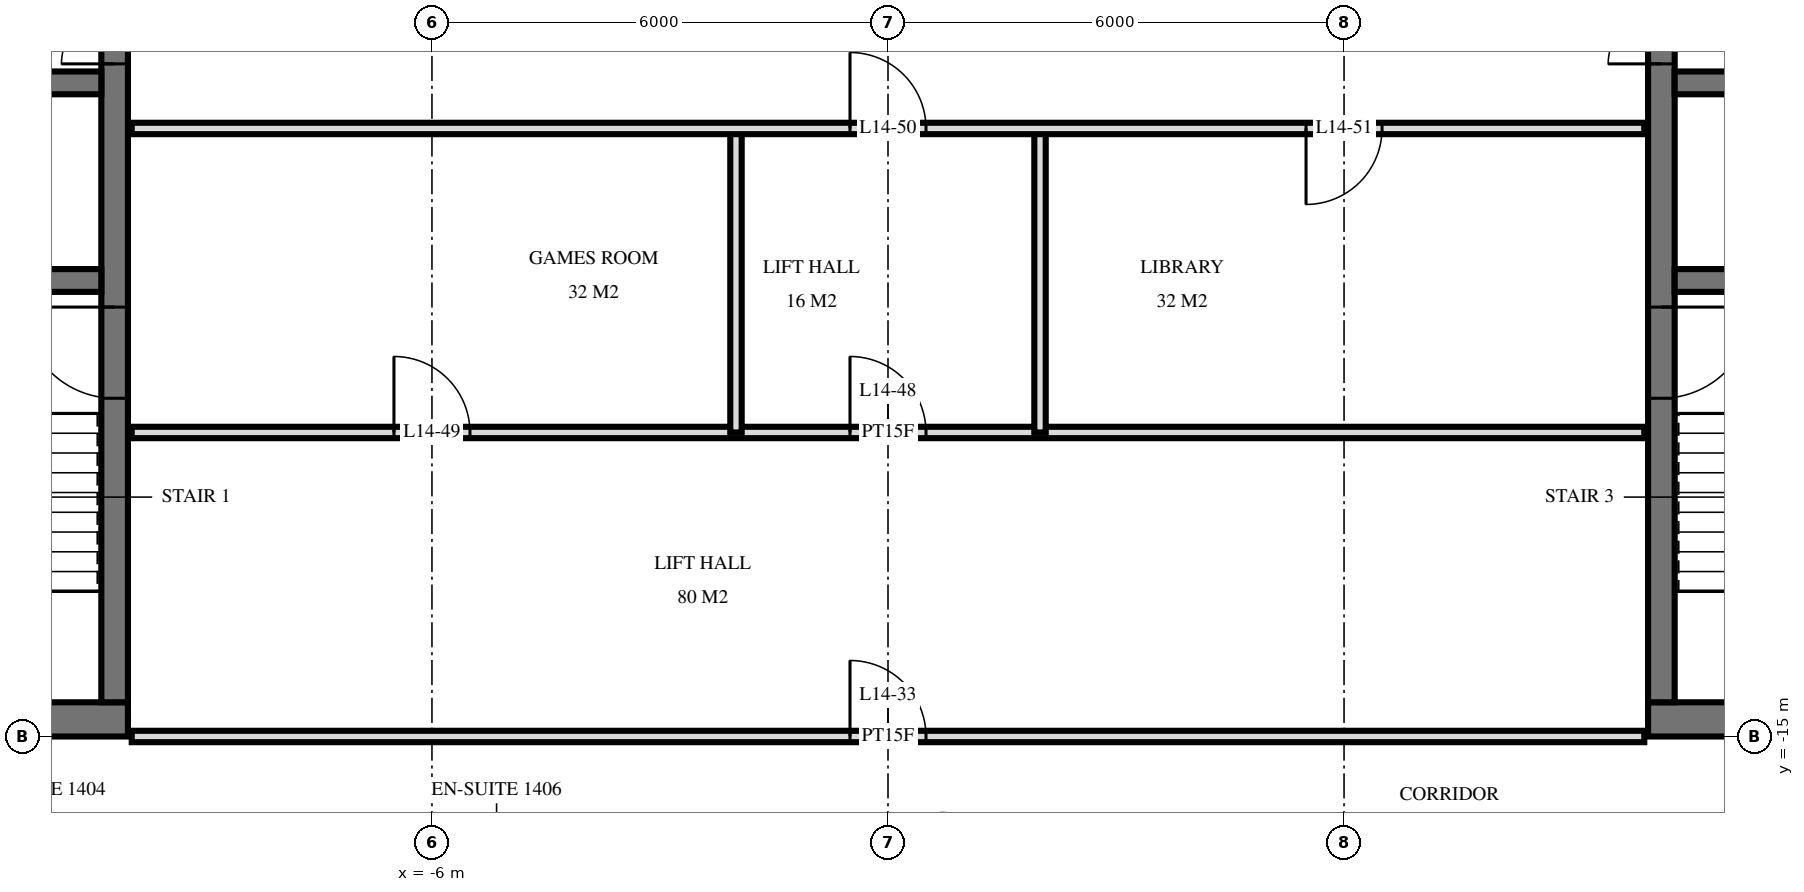
"""IFC4 building model, lengths in metres.
Left out: names, types, materials, properties, quantities, classifications, styles, units other than length and angle.
Written with IfcOpenShell. Run it as: python <this file> out.ifc"""

import sys

from ifc_helpers import new_model, si_unit, direction, frame, frame_2d, origin, place, context, subcontext, project, spatial, rectangle, extrude, element, fill, save


model = new_model("IFC4")
c1 = context("Model", 3, precision=1e-05, world=origin(), true_north=direction((0.0, 1.0)))
c2 = subcontext(c1, "Body", "Model", "MODEL_VIEW")
j1 = project(units=[si_unit("LENGTHUNIT", "METRE"), si_unit("PLANEANGLEUNIT", "RADIAN")], contexts=[c1])
p1 = place(None, origin())
s1 = spatial("IfcSite", under=j1, at=p1, CompositionType="ELEMENT")
p2 = place(p1, origin())
s2 = spatial("IfcBuilding", under=s1, at=p2, CompositionType="ELEMENT")
p3 = place(p2, frame((0.0, 0.0, 60.0)))
s3 = spatial("IfcBuildingStorey", under=s2, at=p3, CompositionType="ELEMENT", Elevation=60.0)
p4 = place(p3, frame((-29.5, -14.775, 0.0), z_axis=(0.0, 0.0, 1.0), x_axis=(1.0, 0.0, 0.0)))
e1 = element("IfcWall", 1, at=p4, inside=s3, PredefinedType="SHEAR", context=c2, shape_type="SweptSolid", body=[
    extrude(rectangle(XDim=19.5, YDim=0.45, at=frame_2d((9.75, 0.0))), origin(), (0.0, 0.0, 1.0), 3.6),
])
p5 = place(p4, frame((11.2, 0.0, 0.0)))
e2 = element("IfcOpeningElement", 2, at=p5, cuts=e1, PredefinedType="OPENING", context=c2, shape_type="SweptSolid", body=[
    extrude(rectangle(XDim=1.2, YDim=2.1, at=frame_2d((0.6, 1.05))), frame((0.0, 0.235, 0.0), z_axis=(0.0, -1.0, 0.0), x_axis=(1.0, 0.0, 0.0)), (0.0, 0.0, 1.0), 0.47),
])
p6 = place(p4, frame((14.25, 0.0, 0.0)))
e3 = element("IfcOpeningElement", 3, at=p6, cuts=e1, PredefinedType="OPENING", context=c2, shape_type="SweptSolid", body=[
    extrude(rectangle(XDim=1.1, YDim=2.1, at=frame_2d((0.55, 1.05))), frame((0.0, 0.235, 0.0), z_axis=(0.0, -1.0, 0.0), x_axis=(1.0, 0.0, 0.0)), (0.0, 0.0, 1.0), 0.47),
])
p7 = place(p4, frame((8.5, 0.0, 0.0)))
e4 = element("IfcOpeningElement", 4, at=p7, cuts=e1, PredefinedType="OPENING", context=c2, shape_type="SweptSolid", body=[
    extrude(rectangle(XDim=0.9, YDim=2.1, at=frame_2d((0.45, 1.05))), frame((0.0, 0.235, 0.0), z_axis=(0.0, -1.0, 0.0), x_axis=(1.0, 0.0, 0.0)), (0.0, 0.0, 1.0), 0.47),
])
p8 = place(p4, frame((6.05, 0.0, 0.0)))
e5 = element("IfcOpeningElement", 5, at=p8, cuts=e1, PredefinedType="OPENING", context=c2, shape_type="SweptSolid", body=[
    extrude(rectangle(XDim=1.0, YDim=2.1, at=frame_2d((0.5, 1.05))), frame((0.0, 0.235, 0.0), z_axis=(0.0, -1.0, 0.0), x_axis=(1.0, 0.0, 0.0)), (0.0, 0.0, 1.0), 0.47),
])
p9 = place(p4, frame((3.413, 0.0, 0.0)))
e6 = element("IfcOpeningElement", 6, at=p9, cuts=e1, PredefinedType="OPENING", context=c2, shape_type="SweptSolid", body=[
    extrude(rectangle(XDim=1.0, YDim=2.1, at=frame_2d((0.5, 1.05))), frame((0.0, 0.235, 0.0), z_axis=(0.0, -1.0, 0.0), x_axis=(1.0, 0.0, 0.0)), (0.0, 0.0, 1.0), 0.47),
])
p10 = place(p4, frame((1.087, 0.0, 0.0)))
e7 = element("IfcOpeningElement", 7, at=p10, cuts=e1, PredefinedType="OPENING", context=c2, shape_type="SweptSolid", body=[
    extrude(rectangle(XDim=1.0, YDim=2.1, at=frame_2d((0.5, 1.05))), frame((0.0, 0.235, 0.0), z_axis=(0.0, -1.0, 0.0), x_axis=(1.0, 0.0, 0.0)), (0.0, 0.0, 1.0), 0.47),
])
p11 = place(p3, frame((-10.175, -14.55, 0.0), z_axis=(0.0, 0.0, 1.0), x_axis=(0.0, 1.0, 0.0)))
e8 = element("IfcWall", 8, at=p11, inside=s3, PredefinedType="SHEAR", context=c2, shape_type="SweptSolid", body=[
    extrude(rectangle(XDim=14.1, YDim=0.35, at=frame_2d((7.05, 0.0))), origin(), (0.0, 0.0, 1.0), 3.6),
])
p12 = place(p11, frame((8.4, 0.0, 0.0)))
e9 = element("IfcOpeningElement", 9, at=p12, cuts=e8, PredefinedType="OPENING", context=c2, shape_type="SweptSolid", body=[
    extrude(rectangle(XDim=1.4, YDim=2.4, at=frame_2d((0.7, 1.2))), frame((0.0, 0.185, 0.0), z_axis=(0.0, -1.0, 0.0), x_axis=(1.0, 0.0, 0.0)), (0.0, 0.0, 1.0), 0.37),
])
p13 = place(p11, frame((10.0, 0.0, 0.0)))
e10 = element("IfcOpeningElement", 10, at=p13, cuts=e8, PredefinedType="OPENING", context=c2, shape_type="SweptSolid", body=[
    extrude(rectangle(XDim=1.4, YDim=2.4, at=frame_2d((0.7, 1.2))), frame((0.0, 0.185, 0.0), z_axis=(0.0, -1.0, 0.0), x_axis=(1.0, 0.0, 0.0)), (0.0, 0.0, 1.0), 0.37),
])
p14 = place(p11, frame((4.0, 0.0, 0.0)))
e11 = element("IfcOpeningElement", 11, at=p14, cuts=e8, PredefinedType="OPENING", context=c2, shape_type="SweptSolid", body=[
    extrude(rectangle(XDim=1.2, YDim=2.1, at=frame_2d((0.6, 1.05))), frame((0.0, 0.185, 0.0), z_axis=(0.0, -1.0, 0.0), x_axis=(1.0, 0.0, 0.0)), (0.0, 0.0, 1.0), 0.37),
])
p15 = place(p3, frame((-29.05, -6.4, 0.0), z_axis=(0.0, 0.0, 1.0), x_axis=(1.0, 0.0, 0.0)))
e12 = element("IfcWall", 12, at=p15, inside=s3, PredefinedType="SHEAR", context=c2, shape_type="SweptSolid", body=[
    extrude(rectangle(XDim=18.7, YDim=0.3, at=frame_2d((9.35, 0.0))), origin(), (0.0, 0.0, 1.0), 3.6),
])
p16 = place(p15, frame((2.95, 0.0, 0.0)))
e13 = element("IfcOpeningElement", 13, at=p16, cuts=e12, PredefinedType="OPENING", context=c2, shape_type="SweptSolid", body=[
    extrude(rectangle(XDim=1.1, YDim=2.1, at=frame_2d((0.55, 1.05))), frame((0.0, 0.16, 0.0), z_axis=(0.0, -1.0, 0.0), x_axis=(1.0, 0.0, 0.0)), (0.0, 0.0, 1.0), 0.32),
])
p17 = place(p15, frame((0.55, 0.0, 0.0)))
e14 = element("IfcOpeningElement", 14, at=p17, cuts=e12, PredefinedType="OPENING", context=c2, shape_type="SweptSolid", body=[
    extrude(rectangle(XDim=1.1, YDim=2.1, at=frame_2d((0.55, 1.05))), frame((0.0, 0.16, 0.0), z_axis=(0.0, -1.0, 0.0), x_axis=(1.0, 0.0, 0.0)), (0.0, 0.0, 1.0), 0.32),
])
p18 = place(p15, frame((10.8, 0.0, 0.0)))
e15 = element("IfcOpeningElement", 15, at=p18, cuts=e12, PredefinedType="OPENING", context=c2, shape_type="SweptSolid", body=[
    extrude(rectangle(XDim=1.1, YDim=2.1, at=frame_2d((0.55, 1.05))), frame((0.0, 0.16, 0.0), z_axis=(0.0, -1.0, 0.0), x_axis=(1.0, 0.0, 0.0)), (0.0, 0.0, 1.0), 0.32),
])
p19 = place(p15, frame((5.6, 0.0, 0.0)))
e16 = element("IfcOpeningElement", 16, at=p19, cuts=e12, PredefinedType="OPENING", context=c2, shape_type="SweptSolid", body=[
    extrude(rectangle(XDim=1.0, YDim=2.1, at=frame_2d((0.5, 1.05))), frame((0.0, 0.16, 0.0), z_axis=(0.0, -1.0, 0.0), x_axis=(1.0, 0.0, 0.0)), (0.0, 0.0, 1.0), 0.32),
])
p20 = place(p3, frame((-29.05, -9.0, 0.0), z_axis=(0.0, 0.0, 1.0), x_axis=(1.0, 0.0, 0.0)))
e17 = element("IfcWall", 17, at=p20, inside=s3, PredefinedType="SHEAR", context=c2, shape_type="SweptSolid", body=[
    extrude(rectangle(XDim=18.7, YDim=0.3, at=frame_2d((9.35, 0.0))), origin(), (0.0, 0.0, 1.0), 3.6),
])
p21 = place(p20, frame((13.8, 0.0, 0.0)))
e18 = element("IfcOpeningElement", 18, at=p21, cuts=e17, PredefinedType="OPENING", context=c2, shape_type="SweptSolid", body=[
    extrude(rectangle(XDim=1.1, YDim=2.1, at=frame_2d((0.55, 1.05))), frame((0.0, 0.16, 0.0), z_axis=(0.0, -1.0, 0.0), x_axis=(1.0, 0.0, 0.0)), (0.0, 0.0, 1.0), 0.32),
])
p22 = place(p3, frame((10.0, -14.775, 0.0), z_axis=(0.0, 0.0, 1.0), x_axis=(1.0, 0.0, 0.0)))
e19 = element("IfcWall", 19, at=p22, inside=s3, PredefinedType="SHEAR", context=c2, shape_type="SweptSolid", body=[
    extrude(rectangle(XDim=19.5, YDim=0.45, at=frame_2d((9.75, 0.0))), origin(), (0.0, 0.0, 1.0), 3.6),
])
p23 = place(p22, frame((7.1, 0.0, 0.0)))
e20 = element("IfcOpeningElement", 20, at=p23, cuts=e19, PredefinedType="OPENING", context=c2, shape_type="SweptSolid", body=[
    extrude(rectangle(XDim=1.2, YDim=2.1, at=frame_2d((0.6, 1.05))), frame((0.0, 0.235, 0.0), z_axis=(0.0, -1.0, 0.0), x_axis=(1.0, 0.0, 0.0)), (0.0, 0.0, 1.0), 0.47),
])
p24 = place(p22, frame((4.15, 0.0, 0.0)))
e21 = element("IfcOpeningElement", 21, at=p24, cuts=e19, PredefinedType="OPENING", context=c2, shape_type="SweptSolid", body=[
    extrude(rectangle(XDim=1.1, YDim=2.1, at=frame_2d((0.55, 1.05))), frame((0.0, 0.235, 0.0), z_axis=(0.0, -1.0, 0.0), x_axis=(1.0, 0.0, 0.0)), (0.0, 0.0, 1.0), 0.47),
])
p25 = place(p22, frame((10.1, 0.0, 0.0)))
e22 = element("IfcOpeningElement", 22, at=p25, cuts=e19, PredefinedType="OPENING", context=c2, shape_type="SweptSolid", body=[
    extrude(rectangle(XDim=0.9, YDim=2.1, at=frame_2d((0.45, 1.05))), frame((0.0, 0.235, 0.0), z_axis=(0.0, -1.0, 0.0), x_axis=(1.0, 0.0, 0.0)), (0.0, 0.0, 1.0), 0.47),
])
p26 = place(p22, frame((12.45, 0.0, 0.0)))
e23 = element("IfcOpeningElement", 23, at=p26, cuts=e19, PredefinedType="OPENING", context=c2, shape_type="SweptSolid", body=[
    extrude(rectangle(XDim=1.0, YDim=2.1, at=frame_2d((0.5, 1.05))), frame((0.0, 0.235, 0.0), z_axis=(0.0, -1.0, 0.0), x_axis=(1.0, 0.0, 0.0)), (0.0, 0.0, 1.0), 0.47),
])
p27 = place(p22, frame((15.087, 0.0, 0.0)))
e24 = element("IfcOpeningElement", 24, at=p27, cuts=e19, PredefinedType="OPENING", context=c2, shape_type="SweptSolid", body=[
    extrude(rectangle(XDim=1.0, YDim=2.1, at=frame_2d((0.5, 1.05))), frame((0.0, 0.235, 0.0), z_axis=(0.0, -1.0, 0.0), x_axis=(1.0, 0.0, 0.0)), (0.0, 0.0, 1.0), 0.47),
])
p28 = place(p22, frame((17.413, 0.0, 0.0)))
e25 = element("IfcOpeningElement", 25, at=p28, cuts=e19, PredefinedType="OPENING", context=c2, shape_type="SweptSolid", body=[
    extrude(rectangle(XDim=1.0, YDim=2.1, at=frame_2d((0.5, 1.05))), frame((0.0, 0.235, 0.0), z_axis=(0.0, -1.0, 0.0), x_axis=(1.0, 0.0, 0.0)), (0.0, 0.0, 1.0), 0.47),
])
p29 = place(p3, frame((10.175, -14.55, 0.0), z_axis=(0.0, 0.0, 1.0), x_axis=(0.0, 1.0, 0.0)))
e26 = element("IfcWall", 26, at=p29, inside=s3, PredefinedType="SHEAR", context=c2, shape_type="SweptSolid", body=[
    extrude(rectangle(XDim=14.1, YDim=0.35, at=frame_2d((7.05, 0.0))), origin(), (0.0, 0.0, 1.0), 3.6),
])
p30 = place(p29, frame((8.4, 0.0, 0.0)))
e27 = element("IfcOpeningElement", 27, at=p30, cuts=e26, PredefinedType="OPENING", context=c2, shape_type="SweptSolid", body=[
    extrude(rectangle(XDim=1.4, YDim=2.4, at=frame_2d((0.7, 1.2))), frame((0.0, 0.185, 0.0), z_axis=(0.0, -1.0, 0.0), x_axis=(1.0, 0.0, 0.0)), (0.0, 0.0, 1.0), 0.37),
])
p31 = place(p29, frame((10.0, 0.0, 0.0)))
e28 = element("IfcOpeningElement", 28, at=p31, cuts=e26, PredefinedType="OPENING", context=c2, shape_type="SweptSolid", body=[
    extrude(rectangle(XDim=1.4, YDim=2.4, at=frame_2d((0.7, 1.2))), frame((0.0, 0.185, 0.0), z_axis=(0.0, -1.0, 0.0), x_axis=(1.0, 0.0, 0.0)), (0.0, 0.0, 1.0), 0.37),
])
p32 = place(p29, frame((4.0, 0.0, 0.0)))
e29 = element("IfcOpeningElement", 29, at=p32, cuts=e26, PredefinedType="OPENING", context=c2, shape_type="SweptSolid", body=[
    extrude(rectangle(XDim=1.2, YDim=2.1, at=frame_2d((0.6, 1.05))), frame((0.0, 0.185, 0.0), z_axis=(0.0, -1.0, 0.0), x_axis=(1.0, 0.0, 0.0)), (0.0, 0.0, 1.0), 0.37),
])
p33 = place(p3, frame((10.35, -6.4, 0.0), z_axis=(0.0, 0.0, 1.0), x_axis=(1.0, 0.0, 0.0)))
e30 = element("IfcWall", 30, at=p33, inside=s3, PredefinedType="SHEAR", context=c2, shape_type="SweptSolid", body=[
    extrude(rectangle(XDim=18.7, YDim=0.3, at=frame_2d((9.35, 0.0))), origin(), (0.0, 0.0, 1.0), 3.6),
])
p34 = place(p33, frame((14.65, 0.0, 0.0)))
e31 = element("IfcOpeningElement", 31, at=p34, cuts=e30, PredefinedType="OPENING", context=c2, shape_type="SweptSolid", body=[
    extrude(rectangle(XDim=1.1, YDim=2.1, at=frame_2d((0.55, 1.05))), frame((0.0, 0.16, 0.0), z_axis=(0.0, -1.0, 0.0), x_axis=(1.0, 0.0, 0.0)), (0.0, 0.0, 1.0), 0.32),
])
p35 = place(p33, frame((17.05, 0.0, 0.0)))
e32 = element("IfcOpeningElement", 32, at=p35, cuts=e30, PredefinedType="OPENING", context=c2, shape_type="SweptSolid", body=[
    extrude(rectangle(XDim=1.1, YDim=2.1, at=frame_2d((0.55, 1.05))), frame((0.0, 0.16, 0.0), z_axis=(0.0, -1.0, 0.0), x_axis=(1.0, 0.0, 0.0)), (0.0, 0.0, 1.0), 0.32),
])
p36 = place(p33, frame((6.8, 0.0, 0.0)))
e33 = element("IfcOpeningElement", 33, at=p36, cuts=e30, PredefinedType="OPENING", context=c2, shape_type="SweptSolid", body=[
    extrude(rectangle(XDim=1.1, YDim=2.1, at=frame_2d((0.55, 1.05))), frame((0.0, 0.16, 0.0), z_axis=(0.0, -1.0, 0.0), x_axis=(1.0, 0.0, 0.0)), (0.0, 0.0, 1.0), 0.32),
])
p37 = place(p33, frame((12.1, 0.0, 0.0)))
e34 = element("IfcOpeningElement", 34, at=p37, cuts=e30, PredefinedType="OPENING", context=c2, shape_type="SweptSolid", body=[
    extrude(rectangle(XDim=1.0, YDim=2.1, at=frame_2d((0.5, 1.05))), frame((0.0, 0.16, 0.0), z_axis=(0.0, -1.0, 0.0), x_axis=(1.0, 0.0, 0.0)), (0.0, 0.0, 1.0), 0.32),
])
p38 = place(p3, frame((10.35, -9.0, 0.0), z_axis=(0.0, 0.0, 1.0), x_axis=(1.0, 0.0, 0.0)))
e35 = element("IfcWall", 35, at=p38, inside=s3, PredefinedType="SHEAR", context=c2, shape_type="SweptSolid", body=[
    extrude(rectangle(XDim=18.7, YDim=0.3, at=frame_2d((9.35, 0.0))), origin(), (0.0, 0.0, 1.0), 3.6),
])
p39 = place(p38, frame((3.8, 0.0, 0.0)))
e36 = element("IfcOpeningElement", 36, at=p39, cuts=e35, PredefinedType="OPENING", context=c2, shape_type="SweptSolid", body=[
    extrude(rectangle(XDim=1.1, YDim=2.1, at=frame_2d((0.55, 1.05))), frame((0.0, 0.16, 0.0), z_axis=(0.0, -1.0, 0.0), x_axis=(1.0, 0.0, 0.0)), (0.0, 0.0, 1.0), 0.32),
])
for number, where, z_axis, x_axis in (
    (37, (2.0, -11.0, 0.0), (0.0, 0.0, 1.0), (0.0, 1.0, 0.0)),
    (38, (-2.0, -11.0, 0.0), (0.0, 0.0, 1.0), (0.0, 1.0, 0.0)),
):
    element("IfcWall", number, at=place(p3, frame(where, z_axis=z_axis, x_axis=x_axis)), inside=s3, PredefinedType="PARTITIONING", context=c2, shape_type="SweptSolid", body=[
        extrude(rectangle(XDim=4.0, YDim=0.15, at=frame_2d((2.0, 0.0))), origin(), (0.0, 0.0, 1.0), 3.32),
    ])
p40 = place(p3, frame((-9.95, -15.0, 0.0), z_axis=(0.0, 0.0, 1.0), x_axis=(1.0, 0.0, 0.0)))
e39 = element("IfcWall", 39, at=p40, inside=s3, PredefinedType="PARTITIONING", context=c2, shape_type="SweptSolid", body=[
    extrude(rectangle(XDim=19.9, YDim=0.15, at=frame_2d((9.95, 0.0))), origin(), (0.0, 0.0, 1.0), 2.684),
])
p41 = place(p40, frame((9.45, 0.0, 0.0)))
e40 = element("IfcOpeningElement", 40, at=p41, cuts=e39, PredefinedType="OPENING", context=c2, shape_type="SweptSolid", body=[
    extrude(rectangle(XDim=1.0, YDim=2.1, at=frame_2d((0.5, 1.05))), frame((0.0, 0.085, 0.0), z_axis=(0.0, -1.0, 0.0), x_axis=(1.0, 0.0, 0.0)), (0.0, 0.0, 1.0), 0.17),
])
p42 = place(p3, frame((-9.95, -11.0, 0.0), z_axis=(0.0, 0.0, 1.0), x_axis=(1.0, 0.0, 0.0)))
e41 = element("IfcWall", 41, at=p42, inside=s3, PredefinedType="PARTITIONING", context=c2, shape_type="SweptSolid", body=[
    extrude(rectangle(XDim=19.9, YDim=0.15, at=frame_2d((9.95, 0.0))), origin(), (0.0, 0.0, 1.0), 3.32),
])
p43 = place(p42, frame((9.45, 0.0, 0.0)))
e42 = element("IfcOpeningElement", 42, at=p43, cuts=e41, PredefinedType="OPENING", context=c2, shape_type="SweptSolid", body=[
    extrude(rectangle(XDim=1.0, YDim=2.1, at=frame_2d((0.5, 1.05))), frame((0.0, 0.085, 0.0), z_axis=(0.0, -1.0, 0.0), x_axis=(1.0, 0.0, 0.0)), (0.0, 0.0, 1.0), 0.17),
])
p44 = place(p42, frame((3.45, 0.0, 0.0)))
e43 = element("IfcOpeningElement", 43, at=p44, cuts=e41, PredefinedType="OPENING", context=c2, shape_type="SweptSolid", body=[
    extrude(rectangle(XDim=1.0, YDim=2.1, at=frame_2d((0.5, 1.05))), frame((0.0, 0.085, 0.0), z_axis=(0.0, -1.0, 0.0), x_axis=(1.0, 0.0, 0.0)), (0.0, 0.0, 1.0), 0.17),
])
p45 = place(p3, frame((-9.95, -7.0, 0.0), z_axis=(0.0, 0.0, 1.0), x_axis=(1.0, 0.0, 0.0)))
e44 = element("IfcWall", 44, at=p45, inside=s3, PredefinedType="PARTITIONING", context=c2, shape_type="SweptSolid", body=[
    extrude(rectangle(XDim=19.9, YDim=0.15, at=frame_2d((9.95, 0.0))), origin(), (0.0, 0.0, 1.0), 3.32),
])
p46 = place(p45, frame((9.45, 0.0, 0.0)))
e45 = element("IfcOpeningElement", 45, at=p46, cuts=e44, PredefinedType="OPENING", context=c2, shape_type="SweptSolid", body=[
    extrude(rectangle(XDim=1.0, YDim=2.1, at=frame_2d((0.5, 1.05))), frame((0.0, 0.085, 0.0), z_axis=(0.0, -1.0, 0.0), x_axis=(1.0, 0.0, 0.0)), (0.0, 0.0, 1.0), 0.17),
])
p47 = place(p45, frame((15.45, 0.0, 0.0)))
e46 = element("IfcOpeningElement", 46, at=p47, cuts=e44, PredefinedType="OPENING", context=c2, shape_type="SweptSolid", body=[
    extrude(rectangle(XDim=1.0, YDim=2.1, at=frame_2d((0.5, 1.05))), frame((0.0, 0.085, 0.0), z_axis=(0.0, -1.0, 0.0), x_axis=(1.0, 0.0, 0.0)), (0.0, 0.0, 1.0), 0.17),
])
p48 = place(p12, origin())
e47 = element("IfcDoor", 47, at=p48, inside=s3, OperationType="DOUBLE_DOOR_SINGLE_SWING", PredefinedType="DOOR", context=c2, shape_type="SweptSolid", body=[
    extrude(rectangle(XDim=1.4, YDim=2.4, at=frame_2d((0.7, 1.2))), frame((0.0, 0.025, 0.0), z_axis=(0.0, -1.0, 0.0), x_axis=(1.0, 0.0, 0.0)), (0.0, 0.0, 1.0), 0.05),
])
fill(e9, e47)
p49 = place(p14, origin())
e48 = element("IfcDoor", 48, at=p49, inside=s3, OperationType="SINGLE_SWING_LEFT", PredefinedType="DOOR", context=c2, shape_type="SweptSolid", body=[
    extrude(rectangle(XDim=1.2, YDim=2.1, at=frame_2d((0.6, 1.05))), frame((0.0, 0.025, 0.0), z_axis=(0.0, -1.0, 0.0), x_axis=(1.0, 0.0, 0.0)), (0.0, 0.0, 1.0), 0.05),
])
fill(e11, e48)
p50 = place(p30, origin())
e49 = element("IfcDoor", 49, at=p50, inside=s3, OperationType="DOUBLE_DOOR_SINGLE_SWING", PredefinedType="DOOR", context=c2, shape_type="SweptSolid", body=[
    extrude(rectangle(XDim=1.4, YDim=2.4, at=frame_2d((0.7, 1.2))), frame((0.0, 0.025, 0.0), z_axis=(0.0, -1.0, 0.0), x_axis=(1.0, 0.0, 0.0)), (0.0, 0.0, 1.0), 0.05),
])
fill(e27, e49)
p51 = place(p32, frame((0.6, 0.0, 0.0), z_axis=(0.0, 0.0, 1.0), x_axis=(-1.0, 0.0, 0.0)))
e50 = element("IfcDoor", 50, at=p51, inside=s3, OperationType="SINGLE_SWING_RIGHT", PredefinedType="DOOR", context=c2, shape_type="SweptSolid", body=[
    extrude(rectangle(XDim=1.2, YDim=2.1, at=frame_2d((0.0, 1.05))), frame((0.0, -0.025, 0.0), z_axis=(0.0, 1.0, 0.0), x_axis=(-1.0, 0.0, 0.0)), (0.0, 0.0, 1.0), 0.05),
])
fill(e29, e50)
p52 = place(p41, origin())
e51 = element("IfcDoor", 51, at=p52, inside=s3, OperationType="SINGLE_SWING_RIGHT", PredefinedType="DOOR", context=c2, shape_type="SweptSolid", body=[
    extrude(rectangle(XDim=1.0, YDim=2.1, at=frame_2d((0.5, 1.05))), frame((0.0, 0.025, 0.0), z_axis=(0.0, -1.0, 0.0), x_axis=(1.0, 0.0, 0.0)), (0.0, 0.0, 1.0), 0.05),
])
fill(e40, e51)
p53 = place(p43, origin())
e52 = element("IfcDoor", 52, at=p53, inside=s3, OperationType="SINGLE_SWING_RIGHT", PredefinedType="DOOR", context=c2, shape_type="SweptSolid", body=[
    extrude(rectangle(XDim=1.0, YDim=2.1, at=frame_2d((0.5, 1.05))), frame((0.0, 0.025, 0.0), z_axis=(0.0, -1.0, 0.0), x_axis=(1.0, 0.0, 0.0)), (0.0, 0.0, 1.0), 0.05),
])
fill(e42, e52)
p54 = place(p44, origin())
e53 = element("IfcDoor", 53, at=p54, inside=s3, OperationType="SINGLE_SWING_RIGHT", PredefinedType="DOOR", context=c2, shape_type="SweptSolid", body=[
    extrude(rectangle(XDim=1.0, YDim=2.1, at=frame_2d((0.5, 1.05))), frame((0.0, 0.025, 0.0), z_axis=(0.0, -1.0, 0.0), x_axis=(1.0, 0.0, 0.0)), (0.0, 0.0, 1.0), 0.05),
])
fill(e43, e53)
p55 = place(p46, origin())
e54 = element("IfcDoor", 54, at=p55, inside=s3, OperationType="SINGLE_SWING_RIGHT", PredefinedType="DOOR", context=c2, shape_type="SweptSolid", body=[
    extrude(rectangle(XDim=1.0, YDim=2.1, at=frame_2d((0.5, 1.05))), frame((0.0, 0.025, 0.0), z_axis=(0.0, -1.0, 0.0), x_axis=(1.0, 0.0, 0.0)), (0.0, 0.0, 1.0), 0.05),
])
fill(e45, e54)
p56 = place(p47, frame((0.5, 0.0, 0.0), z_axis=(0.0, 0.0, 1.0), x_axis=(-1.0, 0.0, 0.0)))
e55 = element("IfcDoor", 55, at=p56, inside=s3, OperationType="SINGLE_SWING_LEFT", PredefinedType="DOOR", context=c2, shape_type="SweptSolid", body=[
    extrude(rectangle(XDim=1.0, YDim=2.1, at=frame_2d((0.0, 1.05))), frame((0.0, -0.025, 0.0), z_axis=(0.0, 1.0, 0.0), x_axis=(-1.0, 0.0, 0.0)), (0.0, 0.0, 1.0), 0.05),
])
fill(e46, e55)
save(model, sys.argv[1])
